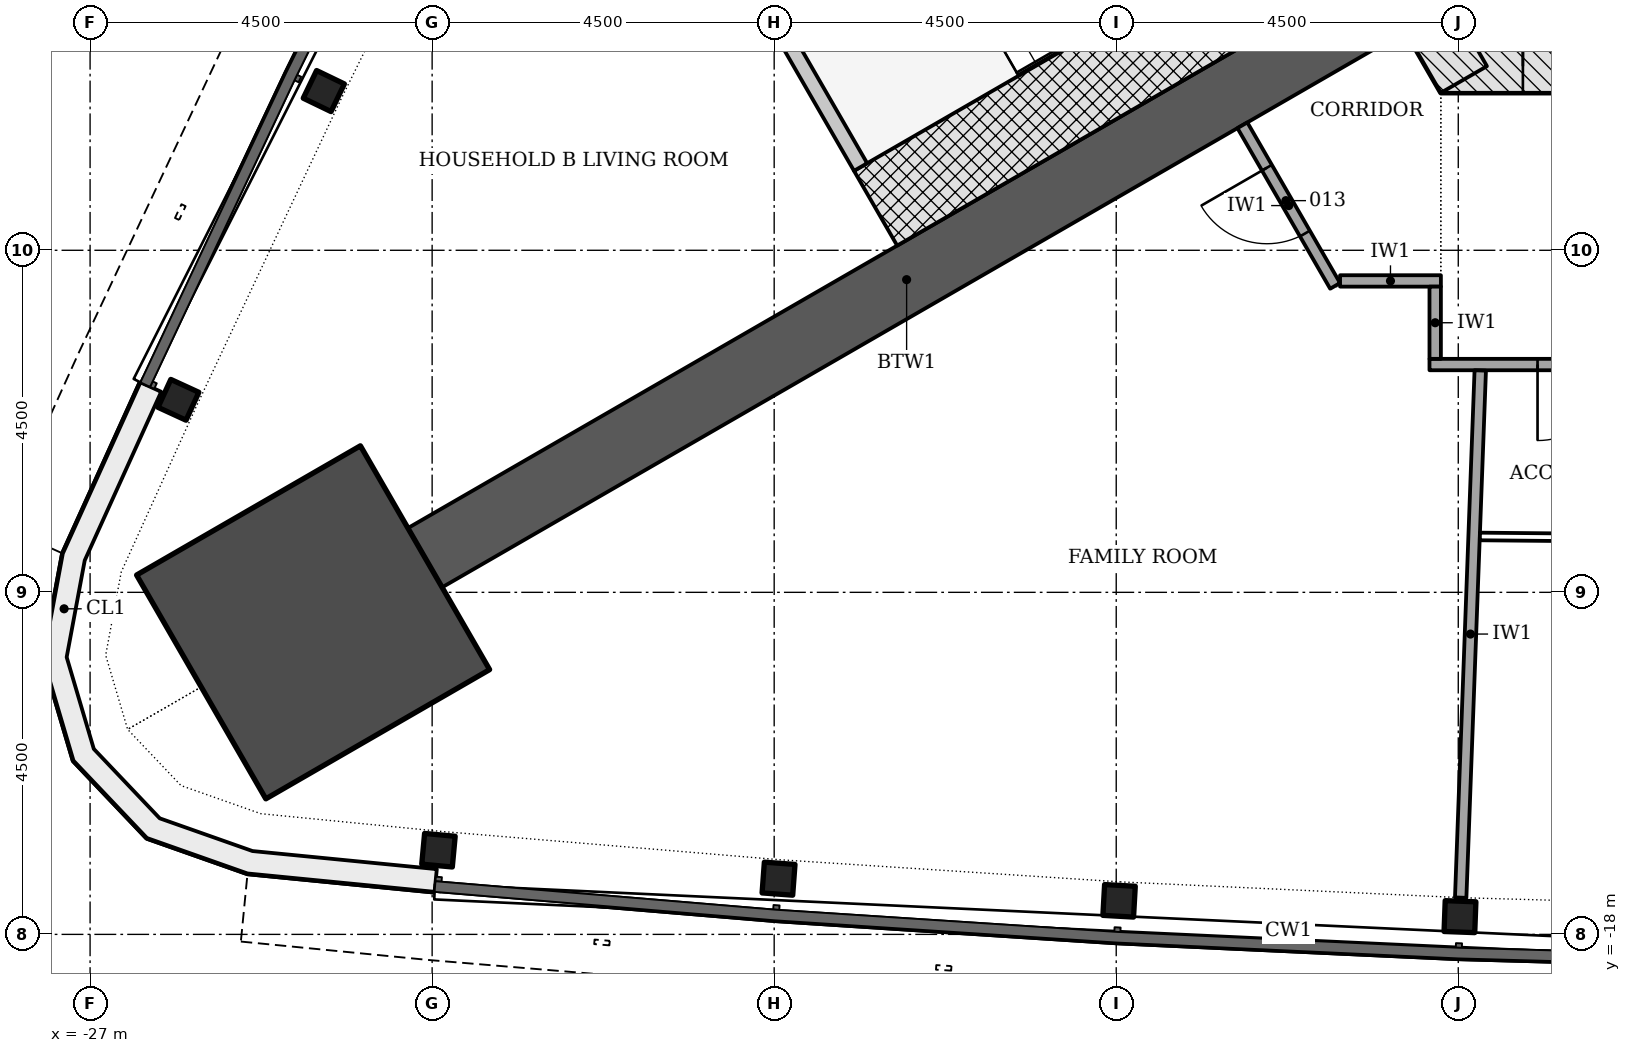
"""IFC4 building model, lengths in metres.
Left out: names, types, materials, properties, quantities, classifications, styles, units other than length and angle.
Written with IfcOpenShell. Run it as: python <this file> out.ifc"""

import sys

from ifc_helpers import new_model, si_unit, direction, frame, frame_2d, origin, origin_2d, place, context, subcontext, project, spatial, polyline, rectangle, i_section, outline, extrude, element, fill, save


model = new_model("IFC4")
c1 = context("Model", 3, precision=1e-05, world=origin(), true_north=direction((0.0, 1.0)))
c2 = subcontext(c1, "Body", "Model", "MODEL_VIEW")
j1 = project(units=[si_unit("LENGTHUNIT", "METRE"), si_unit("PLANEANGLEUNIT", "RADIAN")], contexts=[c1])
p1 = place(None, origin())
s1 = spatial("IfcSite", under=j1, at=p1, CompositionType="ELEMENT")
p2 = place(p1, origin())
s2 = spatial("IfcBuilding", under=s1, at=p2, CompositionType="ELEMENT")
p3 = place(p2, frame((0.0, 0.0, 24.0)))
s3 = spatial("IfcBuildingStorey", under=s2, at=p3, CompositionType="ELEMENT", Elevation=24.0)
p4 = place(p3, frame((-9.229, -6.578, -0.2), z_axis=(0.0, 0.0, 1.0), x_axis=(1.0, 0.0, 0.0)))
e1 = element("IfcWall", 1, at=p4, inside=s3, PredefinedType="SHEAR", context=c2, shape_type="SweptSolid", body=[
    extrude(rectangle(XDim=18.458, YDim=0.7, at=frame_2d((9.229, 0.0))), origin(), (0.0, 0.0, 1.0), 3.6),
])
p5 = place(p4, frame((3.304, 0.0, 0.2)))
e2 = element("IfcOpeningElement", 2, at=p5, cuts=e1, PredefinedType="OPENING", context=c2, shape_type="SweptSolid", body=[
    extrude(rectangle(XDim=1.1, YDim=2.1, at=frame_2d((0.55, 1.05))), frame((0.0, 0.36, 0.0), z_axis=(0.0, -1.0, 0.0), x_axis=(1.0, 0.0, 0.0)), (0.0, 0.0, 1.0), 0.72),
])
p6 = place(p4, frame((5.454, 0.0, 0.2)))
e3 = element("IfcOpeningElement", 3, at=p6, cuts=e1, PredefinedType="OPENING", context=c2, shape_type="SweptSolid", body=[
    extrude(rectangle(XDim=1.1, YDim=2.1, at=frame_2d((0.55, 1.05))), frame((0.0, 0.36, 0.0), z_axis=(0.0, -1.0, 0.0), x_axis=(1.0, 0.0, 0.0)), (0.0, 0.0, 1.0), 0.72),
])
p7 = place(p4, frame((7.604, 0.0, 0.2)))
e4 = element("IfcOpeningElement", 4, at=p7, cuts=e1, PredefinedType="OPENING", context=c2, shape_type="SweptSolid", body=[
    extrude(rectangle(XDim=1.1, YDim=2.1, at=frame_2d((0.55, 1.05))), frame((0.0, 0.36, 0.0), z_axis=(0.0, -1.0, 0.0), x_axis=(1.0, 0.0, 0.0)), (0.0, 0.0, 1.0), 0.72),
])
p8 = place(p4, frame((9.754, 0.0, 0.2)))
e5 = element("IfcOpeningElement", 5, at=p8, cuts=e1, PredefinedType="OPENING", context=c2, shape_type="SweptSolid", body=[
    extrude(rectangle(XDim=1.1, YDim=2.1, at=frame_2d((0.55, 1.05))), frame((0.0, 0.36, 0.0), z_axis=(0.0, -1.0, 0.0), x_axis=(1.0, 0.0, 0.0)), (0.0, 0.0, 1.0), 0.72),
])
p9 = place(p4, frame((11.904, 0.0, 0.2)))
e6 = element("IfcOpeningElement", 6, at=p9, cuts=e1, PredefinedType="OPENING", context=c2, shape_type="SweptSolid", body=[
    extrude(rectangle(XDim=1.1, YDim=2.1, at=frame_2d((0.55, 1.05))), frame((0.0, 0.36, 0.0), z_axis=(0.0, -1.0, 0.0), x_axis=(1.0, 0.0, 0.0)), (0.0, 0.0, 1.0), 0.72),
])
p10 = place(p4, frame((14.054, 0.0, 0.2)))
e7 = element("IfcOpeningElement", 7, at=p10, cuts=e1, PredefinedType="OPENING", context=c2, shape_type="SweptSolid", body=[
    extrude(rectangle(XDim=1.1, YDim=2.1, at=frame_2d((0.55, 1.05))), frame((0.0, 0.36, 0.0), z_axis=(0.0, -1.0, 0.0), x_axis=(1.0, 0.0, 0.0)), (0.0, 0.0, 1.0), 0.72),
])
p11 = place(p4, frame((1.079, 0.0, 0.2)))
e8 = element("IfcOpeningElement", 8, at=p11, cuts=e1, PredefinedType="OPENING", context=c2, shape_type="SweptSolid", body=[
    extrude(rectangle(XDim=0.9, YDim=2.1, at=frame_2d((0.45, 1.05))), frame((0.0, 0.36, 0.0), z_axis=(0.0, -1.0, 0.0), x_axis=(1.0, 0.0, 0.0)), (0.0, 0.0, 1.0), 0.72),
])
p12 = place(p3, frame((-10.311, -4.353, -0.2), z_axis=(0.0, 0.0, 1.0), x_axis=(0.500042739161, -0.866000726912, 0.0)))
e9 = element("IfcWall", 9, at=p12, inside=s3, PredefinedType="SHEAR", context=c2, shape_type="SweptSolid", body=[
    extrude(rectangle(XDim=2.771, YDim=0.7, at=frame_2d((1.386, 0.0))), origin(), (0.0, 0.0, 1.0), 3.6),
])
p13 = place(p3, frame((-9.922, -5.728, -0.2), z_axis=(0.0, 0.0, 1.0), x_axis=(-0.866028046028, -0.499995423472, 0.0)))
e10 = element("IfcWall", 10, at=p13, inside=s3, PredefinedType="SHEAR", context=c2, shape_type="SweptSolid", body=[
    extrude(rectangle(XDim=14.633, YDim=0.9, at=frame_2d((7.316, 0.0))), origin(), (0.0, 0.0, 1.0), 3.6),
])
p14 = place(p3, frame((-24.066, -13.895, -0.2), z_axis=(0.0, 0.0, 1.0), x_axis=(-0.866025403784, -0.5, 0.0)))
e11 = element("IfcColumn", 11, at=p14, inside=s3, PredefinedType="COLUMN", context=c2, shape_type="SweptSolid", body=[
    extrude(rectangle(XDim=3.4, YDim=3.4, at=origin_2d()), origin(), (0.0, 0.0, 1.0), 3.6),
])
for number, where, z_axis, x_axis in (
    (12, (-23.925, -6.905, -0.2), (0.0, 0.0, 1.0), (-0.434, -0.901, 0.0)),
    (13, (-25.838, -10.967, -0.2), (0.0, 0.0, 1.0), (-0.418, -0.909, 0.0)),
    (14, (-22.417, -16.893, -0.2), (0.0, 0.0, 1.0), (0.996, -0.093, 0.0)),
    (15, (-17.943, -17.267, -0.2), (0.0, 0.0, 1.0), (0.997, -0.074, 0.0)),
    (16, (-13.462, -17.558, -0.2), (0.0, 0.0, 1.0), (0.998, -0.056, 0.0)),
    (17, (-8.978, -17.767, -0.2), (0.0, 0.0, 1.0), (0.999, -0.037, 0.0)),
):
    element("IfcColumn", number, at=place(p3, frame(where, z_axis=z_axis, x_axis=x_axis)), inside=s3, PredefinedType="COLUMN", context=c2, shape_type="SweptSolid", body=[
        extrude(i_section(OverallWidth=0.404, OverallDepth=0.406, WebThickness=0.027, FlangeThickness=0.044, FilletRadius=0.015, at=origin_2d()), origin(), (0.0, 0.0, 1.0), 3.6),
    ])
p15 = place(p3, origin())
e18 = element("IfcWall", 18, at=p15, inside=s3, PredefinedType="NOTDEFINED", context=c2, shape_type="SweptSolid", body=[
    extrude(outline(polyline([(-26.338, -10.738), (-27.359, -12.99), (-27.616, -14.369), (-27.218, -15.715), (-26.252, -16.732), (-24.929, -17.199), (-22.468, -17.44), (-22.438, -17.142), (-24.863, -16.904), (-26.084, -16.473), (-26.951, -15.56), (-27.308, -14.353), (-27.071, -13.08), (-26.064, -10.861), (-26.338, -10.738)])), origin(), (0.0, 0.0, 1.0), 3.3),
])
p16 = place(p3, frame((-10.43, -4.847, -0.2), z_axis=(0.0, 0.0, 1.0), x_axis=(-0.866018442252, -0.500012057535, 0.0)))
e19 = element("IfcWall", 19, at=p16, inside=s3, PredefinedType="SHEAR", context=c2, shape_type="SweptSolid", body=[
    extrude(rectangle(XDim=7.2, YDim=1.136, at=frame_2d((3.6, 0.0))), origin(), (0.0, 0.0, 1.0), 3.6),
])
p17 = place(p3, frame((0.0, 0.0, -0.2)))
e20 = element("IfcWall", 20, at=p17, inside=s3, PredefinedType="SHEAR", context=c2, shape_type="SweptSolid", body=[
    extrude(outline(polyline([(-17.439, -3.907), (-18.025, -6.093), (-16.95, -7.955), (-16.777, -7.855), (-17.81, -6.065), (-17.267, -4.039), (-17.339, -4.081), (-17.339, -4.081), (-17.339, -4.081), (-17.339, -4.081), (-17.339, -4.081), (-17.339, -4.081), (-17.339, -4.081), (-17.339, -4.081), (-17.339, -4.081), (-17.339, -4.081), (-17.339, -4.081), (-17.339, -4.081), (-17.339, -4.081), (-17.339, -4.081), (-17.339, -4.081), (-17.339, -4.081), (-17.339, -4.081), (-17.439, -3.907)])), origin(), (0.0, 0.0, 1.0), 3.6),
])
p18 = place(p3, frame((3.689, -10.503, 0.0), z_axis=(0.0, 0.0, 1.0), x_axis=(-1.0, 0.0, 0.0)))
e21 = element("IfcWall", 21, at=p18, inside=s3, PredefinedType="PARTITIONING", context=c2, shape_type="SweptSolid", body=[
    extrude(rectangle(XDim=13.068, YDim=0.15, at=frame_2d((6.534, 0.0))), origin(), (0.0, 0.0, 1.0), 2.768),
])
p19 = place(p18, frame((10.646, 0.0, 0.0)))
e22 = element("IfcOpeningElement", 22, at=p19, cuts=e21, PredefinedType="OPENING", context=c2, shape_type="SweptSolid", body=[
    extrude(rectangle(XDim=1.0, YDim=2.1, at=frame_2d((0.5, 1.05))), frame((0.0, 0.085, 0.0), z_axis=(0.0, -1.0, 0.0), x_axis=(1.0, 0.0, 0.0)), (0.0, 0.0, 1.0), 0.17),
])
p20 = place(p18, frame((8.118, 0.0, 0.0)))
e23 = element("IfcOpeningElement", 23, at=p20, cuts=e21, PredefinedType="OPENING", context=c2, shape_type="SweptSolid", body=[
    extrude(rectangle(XDim=1.0, YDim=2.1, at=frame_2d((0.5, 1.05))), frame((0.0, 0.085, 0.0), z_axis=(0.0, -1.0, 0.0), x_axis=(1.0, 0.0, 0.0)), (0.0, 0.0, 1.0), 0.17),
])
p21 = place(p18, frame((2.986, 0.0, 0.0)))
e24 = element("IfcOpeningElement", 24, at=p21, cuts=e21, PredefinedType="OPENING", context=c2, shape_type="SweptSolid", body=[
    extrude(rectangle(XDim=1.5, YDim=2.1, at=frame_2d((0.75, 1.05))), frame((0.0, 0.085, 0.0), z_axis=(0.0, -1.0, 0.0), x_axis=(1.0, 0.0, 0.0)), (0.0, 0.0, 1.0), 0.17),
])
p22 = place(p3, frame((-10.62, -9.468, 0.0), z_axis=(0.0, 0.0, 1.0), x_axis=(-0.500045838785, 0.865998937132, 0.0)))
e25 = element("IfcWall", 25, at=p22, inside=s3, PredefinedType="PARTITIONING", context=c2, shape_type="SweptSolid", body=[
    extrude(rectangle(XDim=2.44, YDim=0.15, at=frame_2d((1.22, 0.0))), origin(), (0.0, 0.0, 1.0), 3.4),
])
p23 = place(p22, frame((0.795, 0.0, 0.0)))
e26 = element("IfcOpeningElement", 26, at=p23, cuts=e25, PredefinedType="OPENING", context=c2, shape_type="SweptSolid", body=[
    extrude(rectangle(XDim=1.0, YDim=2.1, at=frame_2d((0.5, 1.05))), frame((0.0, 0.085, 0.0), z_axis=(0.0, -1.0, 0.0), x_axis=(1.0, 0.0, 0.0)), (0.0, 0.0, 1.0), 0.17),
])
p24 = place(p3, frame((-10.555, -9.403, 0.0), z_axis=(0.0, 0.0, 1.0), x_axis=(1.0, 0.0, 0.0)))
e27 = element("IfcWall", 27, at=p24, inside=s3, PredefinedType="PARTITIONING", context=c2, shape_type="SweptSolid", body=[
    extrude(rectangle(XDim=1.326, YDim=0.15, at=frame_2d((0.663, 0.0))), origin(), (0.0, 0.0, 1.0), 3.4),
])
p25 = place(p3, frame((-9.304, -10.428, 0.0), z_axis=(0.0, 0.0, 1.0), x_axis=(0.0, 1.0, 0.0)))
e28 = element("IfcWall", 28, at=p25, inside=s3, PredefinedType="PARTITIONING", context=c2, shape_type="SweptSolid", body=[
    extrude(rectangle(XDim=0.95, YDim=0.15, at=frame_2d((0.475, 0.0))), origin(), (0.0, 0.0, 1.0), 3.4),
])
p26 = place(p3, frame((-8.968, -17.517, 0.0), z_axis=(0.0, 0.0, 1.0), x_axis=(0.037111842783, 0.999311118284, 0.0)))
e29 = element("IfcWall", 29, at=p26, inside=s3, PredefinedType="PARTITIONING", context=c2, shape_type="SweptSolid", body=[
    extrude(rectangle(XDim=6.94, YDim=0.15, at=frame_2d((3.47, 0.0))), origin(), (0.0, 0.0, 1.0), 2.768),
])
p27 = place(p3, frame((-8.715, -12.765, 0.0), z_axis=(0.0, 0.0, 1.0), x_axis=(0.999957193633, -0.00925261596, 0.0)))
e30 = element("IfcWall", 30, at=p27, inside=s3, PredefinedType="PARTITIONING", context=c2, shape_type="SweptSolid", body=[
    extrude(rectangle(XDim=5.066, YDim=0.1, at=frame_2d((2.533, 0.0))), origin(), (0.0, 0.0, 1.0), 2.768),
])
p28 = place(p11, origin())
e31 = element("IfcDoor", 31, at=p28, inside=s3, OperationType="SINGLE_SWING_LEFT", PredefinedType="DOOR", context=c2, shape_type="SweptSolid", body=[
    extrude(rectangle(XDim=0.9, YDim=2.1, at=frame_2d((0.45, 1.05))), frame((0.0, 0.075, 0.0), z_axis=(0.0, -1.0, 0.0), x_axis=(1.0, 0.0, 0.0)), (0.0, 0.0, 1.0), 0.15),
])
fill(e8, e31)
p29 = place(p19, origin())
e32 = element("IfcDoor", 32, at=p29, inside=s3, OperationType="SINGLE_SWING_RIGHT", PredefinedType="DOOR", context=c2, shape_type="SweptSolid", body=[
    extrude(rectangle(XDim=1.0, YDim=2.1, at=frame_2d((0.5, 1.05))), frame((0.0, 0.025, 0.0), z_axis=(0.0, -1.0, 0.0), x_axis=(1.0, 0.0, 0.0)), (0.0, 0.0, 1.0), 0.05),
])
fill(e22, e32)
p30 = place(p23, origin())
e33 = element("IfcDoor", 33, at=p30, inside=s3, OperationType="SINGLE_SWING_RIGHT", PredefinedType="DOOR", context=c2, shape_type="SweptSolid", body=[
    extrude(rectangle(XDim=1.0, YDim=2.1, at=frame_2d((0.5, 1.05))), frame((0.0, 0.025, 0.0), z_axis=(0.0, -1.0, 0.0), x_axis=(1.0, 0.0, 0.0)), (0.0, 0.0, 1.0), 0.05),
])
fill(e26, e33)
save(model, sys.argv[1])
